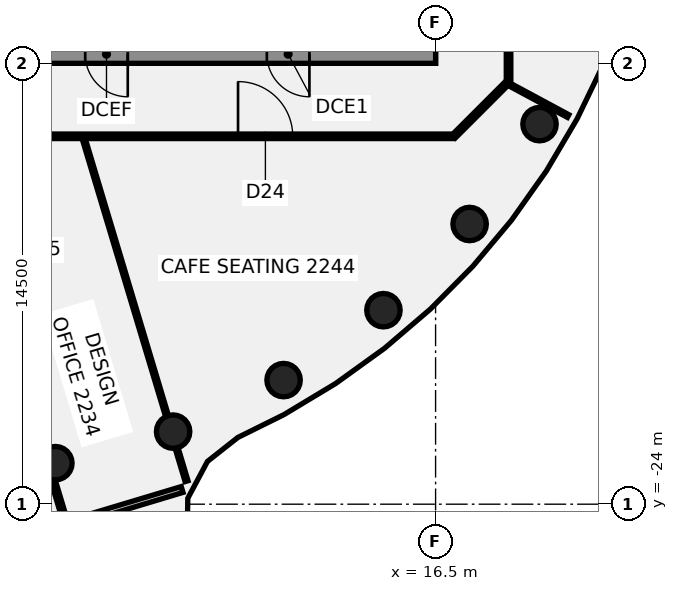
"""IFC4 building model, lengths in metres.
Left out: names, types, materials, properties, quantities, classifications, styles, units other than length and angle.
Written with IfcOpenShell. Run it as: python <this file> out.ifc"""

import sys

from ifc_helpers import new_model, si_unit, direction, frame, frame_2d, origin, origin_2d, place, context, subcontext, project, spatial, rectangle, circle, extrude, element, fill, save


model = new_model("IFC4")
c1 = context("Model", 3, precision=1e-05, world=origin(), true_north=direction((0.0, 1.0)))
c2 = subcontext(c1, "Body", "Model", "MODEL_VIEW")
j1 = project(units=[si_unit("LENGTHUNIT", "METRE"), si_unit("PLANEANGLEUNIT", "RADIAN")], contexts=[c1])
p1 = place(None, origin())
s1 = spatial("IfcSite", under=j1, at=p1, CompositionType="ELEMENT")
p2 = place(p1, origin())
s2 = spatial("IfcBuilding", under=s1, at=p2, CompositionType="ELEMENT")
p3 = place(p2, frame((0.0, 0.0, 94.75)))
s3 = spatial("IfcBuildingStorey", under=s2, at=p3, CompositionType="ELEMENT", Elevation=94.75)
for number, where, z_axis, x_axis in (
    (1, (3.994, -22.651, -0.14), (0.0, 0.0, 1.0), (1.0, 0.0, 0.0)),
    (2, (7.866, -21.613, -0.14), (0.0, 0.0, 1.0), (1.0, 0.0, 0.0)),
    (3, (11.5, -19.919, -0.14), (0.0, 0.0, 1.0), (1.0, 0.0, 0.0)),
    (4, (14.784, -17.619, -0.14), (0.0, 0.0, 1.0), (1.0, 0.0, 0.0)),
    (5, (17.619, -14.784, -0.14), (0.0, 0.0, 1.0), (1.0, 0.0, 0.0)),
    (6, (19.919, -11.5, -0.14), (0.0, 0.0, 1.0), (1.0, 0.0, 0.0)),
):
    element("IfcColumn", number, at=place(p3, frame(where, z_axis=z_axis, x_axis=x_axis)), inside=s3, PredefinedType="COLUMN", context=c2, shape_type="SweptSolid", body=[
        extrude(circle(Radius=0.55, at=origin_2d()), origin(), (0.0, 0.0, 1.0), 3.75),
    ])
p4 = place(p3, frame((3.906, -23.187, 0.0), z_axis=(0.0, 0.0, 1.0), x_axis=(0.287581360313, -0.957756211779, 0.0)))
e7 = element("IfcWall", 7, at=p4, inside=s3, PredefinedType="PARTITIONING", context=c2, shape_type="SweptSolid", body=[
    extrude(rectangle(XDim=1.439, YDim=0.15, at=frame_2d((0.719, 0.0))), origin(), (0.0, 0.0, 1.0), 3.01),
])
p5 = place(p3, frame((4.924, -11.972, 0.0), z_axis=(0.0, 0.0, 1.0), x_axis=(0.287634372124, -0.95774029255, 0.0)))
e8 = element("IfcWall", 8, at=p5, inside=s3, PredefinedType="PARTITIONING", context=c2, shape_type="SweptSolid", body=[
    extrude(rectangle(XDim=9.538, YDim=0.1, at=frame_2d((4.769, 0.0))), origin(), (0.0, 0.0, 1.0), 3.01),
])
p6 = place(p3, frame((7.978, -22.143, 0.0), z_axis=(0.0, 0.0, 1.0), x_axis=(0.287640433477, -0.957738472146, 0.0)))
e9 = element("IfcWall", 9, at=p6, inside=s3, PredefinedType="PARTITIONING", context=c2, shape_type="SweptSolid", body=[
    extrude(rectangle(XDim=1.148, YDim=0.1, at=frame_2d((0.574, 0.0))), origin(), (0.0, 0.0, 1.0), 3.01),
])
p7 = place(p3, frame((18.926, -10.193, 0.0), z_axis=(0.0, 0.0, 1.0), x_axis=(0.880503218244, -0.474040169883, 0.0)))
e10 = element("IfcWall", 10, at=p7, inside=s3, PredefinedType="PARTITIONING", context=c2, shape_type="SweptSolid", body=[
    extrude(rectangle(XDim=2.197, YDim=0.1, at=frame_2d((1.098, 0.0))), origin(), (0.0, 0.0, 1.0), 3.01),
])
p8 = place(p3, frame((-17.1, -11.9, 0.0), z_axis=(0.0, 0.0, 1.0), x_axis=(1.0, 0.0, 0.0)))
e11 = element("IfcWall", 11, at=p8, inside=s3, PredefinedType="PARTITIONING", context=c2, shape_type="SweptSolid", body=[
    extrude(rectangle(XDim=34.165, YDim=0.15, at=frame_2d((17.083, 0.0))), origin(), (0.0, 0.0, 1.0), 3.01),
])
p9 = place(p8, frame((13.217, 0.0, 0.0)))
e12 = element("IfcOpeningElement", 12, at=p9, cuts=e11, PredefinedType="OPENING", context=c2, shape_type="SweptSolid", body=[
    extrude(rectangle(XDim=1.8, YDim=2.1, at=frame_2d((0.9, 1.05))), frame((0.0, 0.085, 0.0), z_axis=(0.0, -1.0, 0.0), x_axis=(1.0, 0.0, 0.0)), (0.0, 0.0, 1.0), 0.17),
])
p10 = place(p8, frame((2.85, 0.0, 0.0)))
e13 = element("IfcOpeningElement", 13, at=p10, cuts=e11, PredefinedType="OPENING", context=c2, shape_type="SweptSolid", body=[
    extrude(rectangle(XDim=1.8, YDim=2.1, at=frame_2d((0.9, 1.05))), frame((0.0, 0.085, 0.0), z_axis=(0.0, -1.0, 0.0), x_axis=(1.0, 0.0, 0.0)), (0.0, 0.0, 1.0), 0.17),
])
p11 = place(p8, frame((27.102, 0.0, 0.0)))
e14 = element("IfcOpeningElement", 14, at=p11, cuts=e11, PredefinedType="OPENING", context=c2, shape_type="SweptSolid", body=[
    extrude(rectangle(XDim=1.8, YDim=2.1, at=frame_2d((0.9, 1.05))), frame((0.0, 0.085, 0.0), z_axis=(0.0, -1.0, 0.0), x_axis=(1.0, 0.0, 0.0)), (0.0, 0.0, 1.0), 0.17),
])
p12 = place(p3, frame((-5.323, -27.567, 0.0), z_axis=(0.0, 0.0, 1.0), x_axis=(0.957744163657, 0.287621482127, 0.0)))
e15 = element("IfcWall", 15, at=p12, inside=s3, PredefinedType="PARTITIONING", context=c2, shape_type="SweptSolid", body=[
    extrude(rectangle(XDim=14.08, YDim=0.2, at=frame_2d((7.04, 0.0))), origin(), (0.0, 0.0, 1.0), 3.01),
])
p13 = place(p12, frame((5.799, 0.0, 0.0)))
e16 = element("IfcOpeningElement", 16, at=p13, cuts=e15, PredefinedType="OPENING", context=c2, shape_type="SweptSolid", body=[
    extrude(rectangle(XDim=1.4, YDim=2.1, at=frame_2d((0.7, 1.05))), frame((0.0, 0.11, 0.0), z_axis=(0.0, -1.0, 0.0), x_axis=(1.0, 0.0, 0.0)), (0.0, 0.0, 1.0), 0.22),
])
p14 = place(p3, frame((17.1, -11.9, 0.0), z_axis=(0.0, 0.0, 1.0), x_axis=(0.707106781187, 0.707106781187, 0.0)))
e17 = element("IfcWall", 17, at=p14, inside=s3, PredefinedType="PARTITIONING", context=c2, shape_type="SweptSolid", body=[
    extrude(rectangle(XDim=2.505, YDim=0.15, at=frame_2d((1.253, 0.0))), origin(), (0.0, 0.0, 1.0), 3.01),
])
p15 = place(p3, frame((18.9, -10.1, 0.0), z_axis=(0.0, 0.0, 1.0), x_axis=(0.0, 1.0, 0.0)))
e18 = element("IfcWall", 18, at=p15, inside=s3, PredefinedType="PARTITIONING", context=c2, shape_type="SweptSolid", body=[
    extrude(rectangle(XDim=20.2, YDim=0.15, at=frame_2d((10.1, 0.0))), origin(), (0.0, 0.0, 1.0), 3.01),
])
p16 = place(p15, frame((9.069, 0.0, 0.0)))
e19 = element("IfcOpeningElement", 19, at=p16, cuts=e18, PredefinedType="OPENING", context=c2, shape_type="SweptSolid", body=[
    extrude(rectangle(XDim=1.8, YDim=2.1, at=frame_2d((0.9, 1.05))), frame((0.0, 0.085, 0.0), z_axis=(0.0, -1.0, 0.0), x_axis=(1.0, 0.0, 0.0)), (0.0, 0.0, 1.0), 0.17),
])
p17 = place(p15, frame((13.619, 0.0, 0.0)))
e20 = element("IfcOpeningElement", 20, at=p17, cuts=e18, PredefinedType="OPENING", context=c2, shape_type="SweptSolid", body=[
    extrude(rectangle(XDim=1.8, YDim=2.1, at=frame_2d((0.9, 1.05))), frame((0.0, 0.085, 0.0), z_axis=(0.0, -1.0, 0.0), x_axis=(1.0, 0.0, 0.0)), (0.0, 0.0, 1.0), 0.17),
])
p18 = place(p3, frame((16.5, -9.2, 0.0), z_axis=(0.0, 0.0, 1.0), x_axis=(-1.0, 0.0, 0.0)))
e21 = element("IfcWall", 21, at=p18, inside=s3, PredefinedType="SHEAR", context=c2, shape_type="SweptSolid", body=[
    extrude(rectangle(XDim=13.0, YDim=0.6, at=frame_2d((6.5, 0.0))), origin(), (0.0, 0.0, 1.0), 3.61),
])
p19 = place(p18, frame((4.15, 0.0, 0.0)))
e22 = element("IfcOpeningElement", 22, at=p19, cuts=e21, PredefinedType="OPENING", context=c2, shape_type="SweptSolid", body=[
    extrude(rectangle(XDim=1.4, YDim=2.1, at=frame_2d((0.7, 1.05))), frame((0.0, 0.31, 0.0), z_axis=(0.0, -1.0, 0.0), x_axis=(1.0, 0.0, 0.0)), (0.0, 0.0, 1.0), 0.62),
])
p20 = place(p18, frame((10.125, 0.0, 0.0)))
e23 = element("IfcOpeningElement", 23, at=p20, cuts=e21, PredefinedType="OPENING", context=c2, shape_type="SweptSolid", body=[
    extrude(rectangle(XDim=1.4, YDim=2.1, at=frame_2d((0.7, 1.05))), frame((0.0, 0.31, 0.0), z_axis=(0.0, -1.0, 0.0), x_axis=(1.0, 0.0, 0.0)), (0.0, 0.0, 1.0), 0.62),
])
p21 = place(p11, frame((1.8, 0.0, 0.0), z_axis=(0.0, 0.0, 1.0), x_axis=(-1.0, 0.0, 0.0)))
e24 = element("IfcDoor", 24, at=p21, inside=s3, OperationType="DOUBLE_DOOR_SINGLE_SWING", PredefinedType="DOOR", context=c2, shape_type="SweptSolid", body=[
    extrude(rectangle(XDim=1.8, YDim=2.1, at=frame_2d((0.9, 1.05))), frame((0.0, 0.025, 0.0), z_axis=(0.0, -1.0, 0.0), x_axis=(1.0, 0.0, 0.0)), (0.0, 0.0, 1.0), 0.05),
])
fill(e14, e24)
p22 = place(p19, origin())
e25 = element("IfcDoor", 25, at=p22, inside=s3, OperationType="SINGLE_SWING_LEFT", PredefinedType="DOOR", context=c2, shape_type="SweptSolid", body=[
    extrude(rectangle(XDim=1.4, YDim=2.1, at=frame_2d((0.7, 1.05))), frame((0.0, 0.025, 0.0), z_axis=(0.0, -1.0, 0.0), x_axis=(1.0, 0.0, 0.0)), (0.0, 0.0, 1.0), 0.05),
])
fill(e22, e25)
p23 = place(p20, origin())
e26 = element("IfcDoor", 26, at=p23, inside=s3, OperationType="SINGLE_SWING_LEFT", PredefinedType="DOOR", context=c2, shape_type="SweptSolid", body=[
    extrude(rectangle(XDim=1.4, YDim=2.1, at=frame_2d((0.7, 1.05))), frame((0.0, 0.025, 0.0), z_axis=(0.0, -1.0, 0.0), x_axis=(1.0, 0.0, 0.0)), (0.0, 0.0, 1.0), 0.05),
])
fill(e23, e26)
save(model, sys.argv[1])
